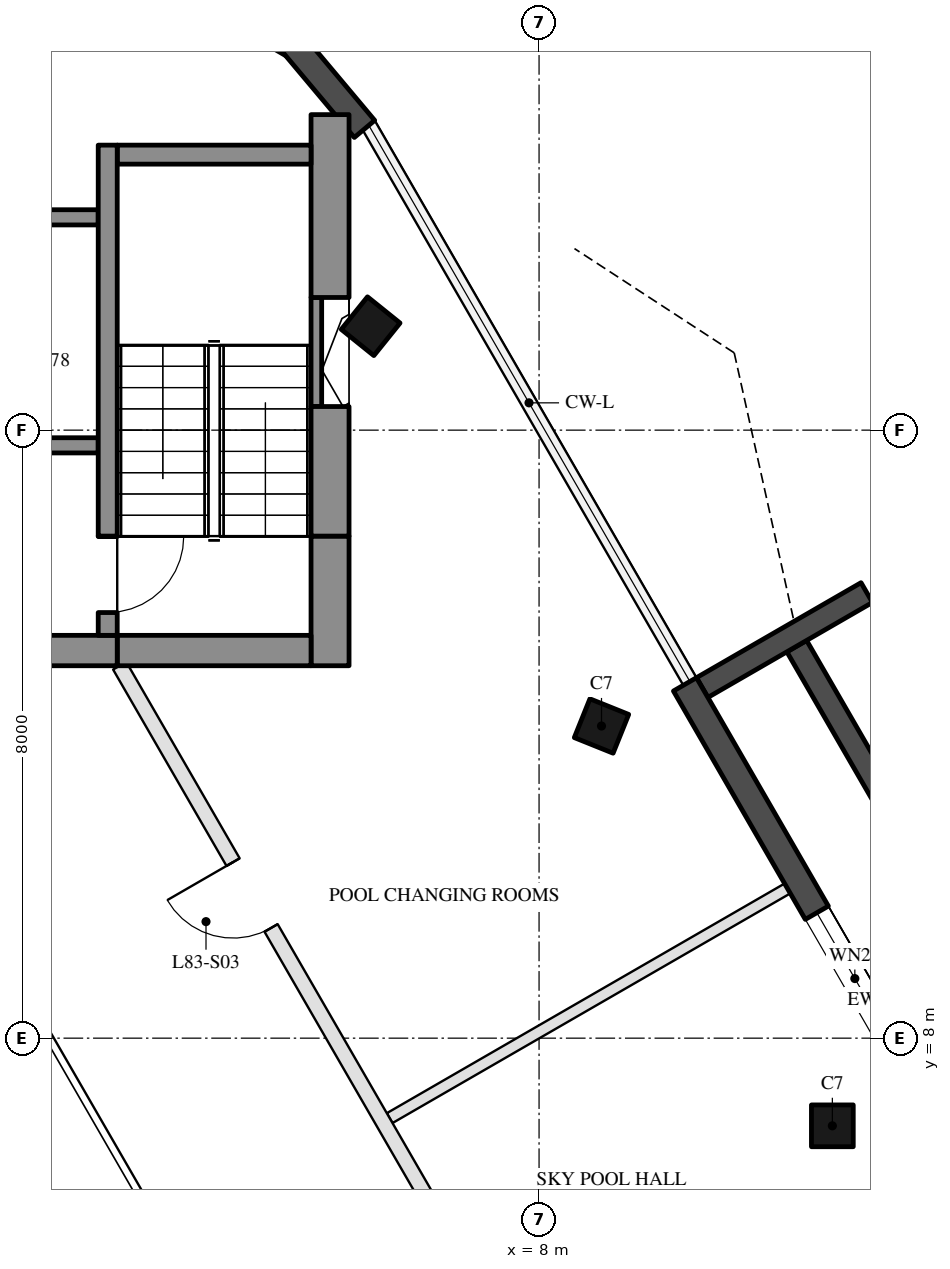
"""IFC4 building model, lengths in metres.
Left out: names, types, materials, properties, quantities, classifications, styles, units other than length and angle.
Written with IfcOpenShell. Run it as: python <this file> out.ifc"""

import sys

from ifc_helpers import new_model, si_unit, direction, frame, frame_2d, origin, origin_2d, place, context, subcontext, project, spatial, rectangle, hollow_rectangle, extrude, boolean, halfspace, element, fill, save


model = new_model("IFC4")
c1 = context("Model", 3, precision=1e-05, world=origin(), true_north=direction((0.0, 1.0)))
c2 = subcontext(c1, "Body", "Model", "MODEL_VIEW")
j1 = project(units=[si_unit("LENGTHUNIT", "METRE"), si_unit("PLANEANGLEUNIT", "RADIAN")], contexts=[c1])
p1 = place(None, origin())
s1 = spatial("IfcSite", under=j1, at=p1, CompositionType="ELEMENT")
p2 = place(p1, origin())
s2 = spatial("IfcBuilding", under=s1, at=p2, CompositionType="ELEMENT")
p3 = place(p2, frame((0.0, 0.0, 331.8)))
s3 = spatial("IfcBuildingStorey", under=s2, at=p3, CompositionType="ELEMENT", Elevation=331.8)
p4 = place(p3, frame((11.859, 6.847, 0.0), z_axis=(-0.075247573053, -0.043479701585, 0.99621650172), x_axis=(0.500351454226, -0.865822396472, 4.550396e-06)))
e1 = element("IfcColumn", 1, at=p4, inside=s3, PredefinedType="COLUMN", context=c2, shape_type="SweptSolid", body=[
    boolean("DIFFERENCE", boolean("DIFFERENCE", extrude(hollow_rectangle(XDim=0.55, YDim=0.55, WallThickness=0.025, at=origin_2d()), origin(), (0.0, 0.0, 1.0), 6.525), halfspace(frame((0.0, 0.0, 0.015), z_axis=(0.0, 0.0, 1.0), x_axis=(1.0, 0.0, 0.0)), True)), halfspace(frame((0.0, 0.0, 6.506), z_axis=(0.0, 0.0, 1.0), x_axis=(1.0, 0.0, 0.0)), False)),
])
p5 = place(p3, frame((8.822, 12.107, 0.0), z_axis=(-0.057738040202, -0.073705749506, 0.995607242442), x_axis=(-0.501061537175, 0.864705350939, 0.034957002453)))
e2 = element("IfcColumn", 2, at=p5, inside=s3, PredefinedType="COLUMN", context=c2, shape_type="SweptSolid", body=[
    boolean("DIFFERENCE", boolean("DIFFERENCE", extrude(hollow_rectangle(XDim=0.55, YDim=0.55, WallThickness=0.025, at=origin_2d()), origin(), (0.0, 0.0, 1.0), 6.529), halfspace(frame((0.0, 0.0, 0.016), z_axis=(0.0, 0.0, 1.0), x_axis=(1.0, 0.0, 0.0)), True)), halfspace(frame((0.0, 0.0, 6.509), z_axis=(0.0, 0.0, 1.0), x_axis=(1.0, 0.0, 0.0)), False)),
])
p6 = place(p3, frame((5.784, 17.367, 0.0), z_axis=(-0.04020096267, -0.1037685016, 0.993788700216), x_axis=(-0.501318150771, 0.862445141844, 0.069774558517)))
e3 = element("IfcColumn", 3, at=p6, inside=s3, PredefinedType="COLUMN", context=c2, shape_type="SweptSolid", body=[
    boolean("DIFFERENCE", boolean("DIFFERENCE", extrude(hollow_rectangle(XDim=0.55, YDim=0.55, WallThickness=0.025, at=origin_2d()), origin(), (0.0, 0.0, 1.0), 6.541), halfspace(frame((0.0, 0.0, 0.018), z_axis=(0.0, 0.0, 1.0), x_axis=(1.0, 0.0, 0.0)), True)), halfspace(frame((0.0, 0.0, 6.517), z_axis=(0.0, 0.0, 1.0), x_axis=(1.0, 0.0, 0.0)), False)),
])
p7 = place(p3, frame((4.806, 21.049, 0.0), z_axis=(0.0, 0.0, 1.0), x_axis=(-0.866055463174, 0.499947931995, 0.0)))
e4 = element("IfcWall", 4, at=p7, inside=s3, PredefinedType="SOLIDWALL", context=c2, shape_type="SweptSolid", body=[
    extrude(rectangle(XDim=1.469, YDim=0.35, at=frame_2d((0.734, 0.0))), origin(), (0.0, 0.0, 1.0), 6.25),
])
p8 = place(p3, frame((5.704, 19.963, 0.0), z_axis=(0.0, 0.0, 1.0), x_axis=(-0.642747598678, 0.766078014561, 0.0)))
e5 = element("IfcWall", 5, at=p8, inside=s3, PredefinedType="SOLIDWALL", context=c2, shape_type="SweptSolid", body=[
    extrude(rectangle(XDim=1.469, YDim=0.35, at=frame_2d((0.734, 0.0))), origin(), (0.0, 0.0, 1.0), 6.25),
])
p9 = place(p3, frame((17.09, 3.285, 0.0), z_axis=(0.0, 0.0, 1.0), x_axis=(-0.500001763848, 0.866024385424, 0.0)))
e6 = element("IfcWall", 6, at=p9, inside=s3, PredefinedType="SOLIDWALL", context=c2, shape_type="SweptSolid", body=[
    extrude(rectangle(XDim=11.4, YDim=0.3, at=frame_2d((5.7, 0.0))), origin(), (0.0, 0.0, 1.0), 1.5),
])
p10 = place(p3, frame((10.146, 12.613, 0.0), z_axis=(0.0, 0.0, 1.0), x_axis=(0.866022959057, 0.500004234368, 0.0)))
e7 = element("IfcWall", 7, at=p10, inside=s3, PredefinedType="SOLIDWALL", context=c2, shape_type="SweptSolid", body=[
    extrude(rectangle(XDim=2.5, YDim=0.3, at=frame_2d((1.25, 0.0))), origin(), (0.0, 0.0, 1.0), 1.5),
])
p11 = place(p3, frame((15.92, 2.263, 0.0), z_axis=(0.0, 0.0, 1.0), x_axis=(-0.49999894854, 0.866026010844, 0.0)))
e8 = element("IfcWall", 8, at=p11, inside=s3, PredefinedType="SOLIDWALL", context=c2, shape_type="SweptSolid", body=[
    extrude(rectangle(XDim=12.0, YDim=0.35, at=frame_2d((6.0, 0.0))), origin(), (0.0, 0.0, 1.0), 6.25),
])
p12 = place(p11, frame((0.456, 0.0, 0.3)))
e9 = element("IfcOpeningElement", 9, at=p12, cuts=e8, PredefinedType="OPENING", context=c2, shape_type="SweptSolid", body=[
    extrude(rectangle(XDim=2.1, YDim=2.65, at=frame_2d((1.05, 1.325))), frame((0.0, 0.185, 0.0), z_axis=(0.0, -1.0, 0.0), x_axis=(1.0, 0.0, 0.0)), (0.0, 0.0, 1.0), 0.37),
])
p13 = place(p11, frame((3.448, 0.0, 0.0)))
e10 = element("IfcOpeningElement", 10, at=p13, cuts=e8, PredefinedType="OPENING", context=c2, shape_type="SweptSolid", body=[
    extrude(rectangle(XDim=2.0, YDim=2.4, at=frame_2d((1.0, 1.2))), frame((0.0, 0.185, 0.0), z_axis=(0.0, -1.0, 0.0), x_axis=(1.0, 0.0, 0.0)), (0.0, 0.0, 1.0), 0.37),
])
p14 = place(p11, frame((6.53, 0.0, 0.3)))
e11 = element("IfcOpeningElement", 11, at=p14, cuts=e8, PredefinedType="OPENING", context=c2, shape_type="SweptSolid", body=[
    extrude(rectangle(XDim=2.0, YDim=2.65, at=frame_2d((1.0, 1.325))), frame((0.0, 0.185, 0.0), z_axis=(0.0, -1.0, 0.0), x_axis=(1.0, 0.0, 0.0)), (0.0, 0.0, 1.0), 0.37),
])
p15 = place(p3, frame((5.07, 16.311, 0.0), z_axis=(0.0, 0.0, 1.0), x_axis=(0.0, 1.0, 0.0)))
e12 = element("IfcWall", 12, at=p15, inside=s3, PredefinedType="SHEAR", context=c2, shape_type="SweptSolid", body=[
    extrude(rectangle(XDim=1.435, YDim=0.14, at=frame_2d((0.717, 0.0))), origin(), (0.0, 0.0, 1.0), 6.25),
])
p16 = place(p3, frame((5.25, 17.746, 0.0), z_axis=(0.0, 0.0, 1.0), x_axis=(0.0, 1.0, 0.0)))
e13 = element("IfcWall", 13, at=p16, inside=s3, PredefinedType="SHEAR", context=c2, shape_type="SweptSolid", body=[
    extrude(rectangle(XDim=2.406, YDim=0.5, at=frame_2d((1.203, 0.0))), origin(), (0.0, 0.0, 1.0), 6.25),
])
p17 = place(p3, frame((5.0, 19.625, 0.0), z_axis=(0.0, 0.0, 1.0), x_axis=(-1.0, 0.0, 0.0)))
e14 = element("IfcWall", 14, at=p17, inside=s3, PredefinedType="SHEAR", context=c2, shape_type="SweptSolid", body=[
    extrude(rectangle(XDim=2.55, YDim=0.25, at=frame_2d((1.275, 0.0))), origin(), (0.0, 0.0, 1.0), 6.25),
])
p18 = place(p3, frame((2.2, 18.8, 0.0), z_axis=(0.0, 0.0, 1.0), x_axis=(-1.0, 0.0, 0.0)))
e15 = element("IfcWall", 15, at=p18, inside=s3, PredefinedType="SHEAR", context=c2, shape_type="SweptSolid", body=[
    extrude(rectangle(XDim=2.8, YDim=0.2, at=frame_2d((1.4, 0.0))), origin(), (0.0, 0.0, 1.0), 6.25),
])
p19 = place(p3, frame((2.2, 15.8, 0.0), z_axis=(0.0, 0.0, 1.0), x_axis=(-1.0, 0.0, 0.0)))
e16 = element("IfcWall", 16, at=p19, inside=s3, PredefinedType="SHEAR", context=c2, shape_type="SweptSolid", body=[
    extrude(rectangle(XDim=2.8, YDim=0.2, at=frame_2d((1.4, 0.0))), origin(), (0.0, 0.0, 1.0), 6.25),
])
p20 = place(p19, frame((0.7, 0.0, 0.0)))
e17 = element("IfcOpeningElement", 17, at=p20, cuts=e16, PredefinedType="OPENING", context=c2, shape_type="SweptSolid", body=[
    extrude(rectangle(XDim=1.2, YDim=2.1, at=frame_2d((0.6, 1.05))), frame((0.0, 0.11, 0.0), z_axis=(0.0, -1.0, 0.0), x_axis=(1.0, 0.0, 0.0)), (0.0, 0.0, 1.0), 0.22),
])
p21 = place(p3, frame((5.25, 12.9, 0.0), z_axis=(0.0, 0.0, 1.0), x_axis=(0.0, 1.0, 0.0)))
e18 = element("IfcWall", 18, at=p21, inside=s3, PredefinedType="SHEAR", context=c2, shape_type="SweptSolid", body=[
    extrude(rectangle(XDim=1.706, YDim=0.5, at=frame_2d((0.853, 0.0))), origin(), (0.0, 0.0, 1.0), 6.25),
])
p22 = place(p3, frame((5.25, 14.606, 0.0), z_axis=(0.0, 0.0, 1.0), x_axis=(0.0, 1.0, 0.0)))
e19 = element("IfcWall", 19, at=p22, inside=s3, PredefinedType="SHEAR", context=c2, shape_type="SweptSolid", body=[
    extrude(rectangle(XDim=1.705, YDim=0.5, at=frame_2d((0.853, 0.0))), origin(), (0.0, 0.0, 1.0), 6.25),
])
p23 = place(p3, frame((5.0, 13.1, 0.0), z_axis=(0.0, 0.0, 1.0), x_axis=(-1.0, 0.0, 0.0)))
e20 = element("IfcWall", 20, at=p23, inside=s3, PredefinedType="SHEAR", context=c2, shape_type="SweptSolid", body=[
    extrude(rectangle(XDim=2.55, YDim=0.4, at=frame_2d((1.275, 0.0))), origin(), (0.0, 0.0, 1.0), 6.25),
])
p24 = place(p3, frame((2.45, 13.1, 0.0), z_axis=(0.0, 0.0, 1.0), x_axis=(-1.0, 0.0, 0.0)))
e21 = element("IfcWall", 21, at=p24, inside=s3, PredefinedType="SHEAR", context=c2, shape_type="SweptSolid", body=[
    extrude(rectangle(XDim=7.45, YDim=0.4, at=frame_2d((3.725, 0.0))), origin(), (0.0, 0.0, 1.0), 6.25),
])
p25 = place(p24, frame((1.0, 0.0, 0.0)))
e22 = element("IfcOpeningElement", 22, at=p25, cuts=e21, PredefinedType="OPENING", context=c2, shape_type="SweptSolid", body=[
    extrude(rectangle(XDim=1.1, YDim=2.1, at=frame_2d((0.55, 1.05))), frame((0.0, 0.21, 0.0), z_axis=(0.0, -1.0, 0.0), x_axis=(1.0, 0.0, 0.0)), (0.0, 0.0, 1.0), 0.42),
])
p26 = place(p24, frame((3.3, 0.0, 0.0)))
e23 = element("IfcOpeningElement", 23, at=p26, cuts=e21, PredefinedType="OPENING", context=c2, shape_type="SweptSolid", body=[
    extrude(rectangle(XDim=1.4, YDim=2.1, at=frame_2d((0.7, 1.05))), frame((0.0, 0.21, 0.0), z_axis=(0.0, -1.0, 0.0), x_axis=(1.0, 0.0, 0.0)), (0.0, 0.0, 1.0), 0.42),
])
p27 = place(p3, frame((2.325, 13.3, 0.0), z_axis=(0.0, 0.0, 1.0), x_axis=(0.0, 1.0, 0.0)))
e24 = element("IfcWall", 24, at=p27, inside=s3, PredefinedType="SHEAR", context=c2, shape_type="SweptSolid", body=[
    extrude(rectangle(XDim=1.306, YDim=0.25, at=frame_2d((0.653, 0.0))), origin(), (0.0, 0.0, 1.0), 6.25),
])
p28 = place(p27, frame((0.3, 0.0, 0.0)))
e25 = element("IfcOpeningElement", 25, at=p28, cuts=e24, PredefinedType="OPENING", context=c2, shape_type="SweptSolid", body=[
    extrude(rectangle(XDim=1.0, YDim=2.1, at=frame_2d((0.5, 1.05))), frame((0.0, 0.135, 0.0), z_axis=(0.0, -1.0, 0.0), x_axis=(1.0, 0.0, 0.0)), (0.0, 0.0, 1.0), 0.27),
])
p29 = place(p3, frame((2.325, 14.606, 0.0), z_axis=(0.0, 0.0, 1.0), x_axis=(0.0, 1.0, 0.0)))
e26 = element("IfcWall", 26, at=p29, inside=s3, PredefinedType="SHEAR", context=c2, shape_type="SweptSolid", body=[
    extrude(rectangle(XDim=5.144, YDim=0.25, at=frame_2d((2.572, 0.0))), origin(), (0.0, 0.0, 1.0), 6.25),
])
p30 = place(p3, frame((11.398, 10.045, 0.0), z_axis=(0.0, 0.0, 1.0), x_axis=(-0.866022127522, -0.500005674609, 0.0)))
e27 = element("IfcWall", 27, at=p30, inside=s3, PredefinedType="PARTITIONING", context=c2, shape_type="SweptSolid", body=[
    extrude(rectangle(XDim=6.193, YDim=0.15, at=frame_2d((3.097, 0.0))), origin(), (0.0, 0.0, 1.0), 5.85),
])
p31 = place(p3, frame((12.413, -4.3, 0.0), z_axis=(0.0, 0.0, 1.0), x_axis=(-0.50000478328, 0.866022642139, 0.0)))
e28 = element("IfcWall", 28, at=p31, inside=s3, PredefinedType="PARTITIONING", context=c2, shape_type="SweptSolid", body=[
    extrude(rectangle(XDim=19.861, YDim=0.2, at=frame_2d((9.931, 0.0))), origin(), (0.0, 0.0, 1.0), 5.85),
])
p32 = place(p31, frame((2.884, 0.0, 0.0)))
e29 = element("IfcOpeningElement", 29, at=p32, cuts=e28, PredefinedType="OPENING", context=c2, shape_type="SweptSolid", body=[
    extrude(rectangle(XDim=1.2, YDim=2.1, at=frame_2d((0.6, 1.05))), frame((0.0, 0.11, 0.0), z_axis=(0.0, -1.0, 0.0), x_axis=(1.0, 0.0, 0.0)), (0.0, 0.0, 1.0), 0.22),
])
p33 = place(p31, frame((9.031, 0.0, 0.0)))
e30 = element("IfcOpeningElement", 30, at=p33, cuts=e28, PredefinedType="OPENING", context=c2, shape_type="SweptSolid", body=[
    extrude(rectangle(XDim=1.8, YDim=2.4, at=frame_2d((0.9, 1.2))), frame((0.0, 0.11, 0.0), z_axis=(0.0, -1.0, 0.0), x_axis=(1.0, 0.0, 0.0)), (0.0, 0.0, 1.0), 0.22),
])
p34 = place(p31, frame((15.877, 0.0, 0.0)))
e31 = element("IfcOpeningElement", 31, at=p34, cuts=e28, PredefinedType="OPENING", context=c2, shape_type="SweptSolid", body=[
    extrude(rectangle(XDim=1.0, YDim=2.1, at=frame_2d((0.5, 1.05))), frame((0.0, 0.11, 0.0), z_axis=(0.0, -1.0, 0.0), x_axis=(1.0, 0.0, 0.0)), (0.0, 0.0, 1.0), 0.22),
])
p35 = place(p14, origin())
e32 = element("IfcWindow", 32, at=p35, inside=s3, PartitioningType="SINGLE_PANEL", PredefinedType="WINDOW", context=c2, shape_type="SweptSolid", body=[
    extrude(rectangle(XDim=2.0, YDim=2.65, at=frame_2d((1.0, 1.325))), frame((0.0, 0.03, 0.0), z_axis=(0.0, -1.0, 0.0), x_axis=(1.0, 0.0, 0.0)), (0.0, 0.0, 1.0), 0.06),
])
fill(e11, e32)
p36 = place(p28, frame((1.0, 0.0, 0.0), z_axis=(0.0, 0.0, 1.0), x_axis=(-1.0, 0.0, 0.0)))
e33 = element("IfcDoor", 33, at=p36, inside=s3, OperationType="SINGLE_SWING_LEFT", PredefinedType="DOOR", context=c2, shape_type="SweptSolid", body=[
    extrude(rectangle(XDim=1.0, YDim=2.1, at=frame_2d((0.5, 1.05))), frame((0.0, 0.025, 0.0), z_axis=(0.0, -1.0, 0.0), x_axis=(1.0, 0.0, 0.0)), (0.0, 0.0, 1.0), 0.05),
])
fill(e25, e33)
p37 = place(p34, origin())
e34 = element("IfcDoor", 34, at=p37, inside=s3, OperationType="SINGLE_SWING_RIGHT", PredefinedType="DOOR", context=c2, shape_type="SweptSolid", body=[
    extrude(rectangle(XDim=1.0, YDim=2.1, at=frame_2d((0.5, 1.05))), frame((0.0, 0.025, 0.0), z_axis=(0.0, -1.0, 0.0), x_axis=(1.0, 0.0, 0.0)), (0.0, 0.0, 1.0), 0.05),
])
fill(e31, e34)
save(model, sys.argv[1])
